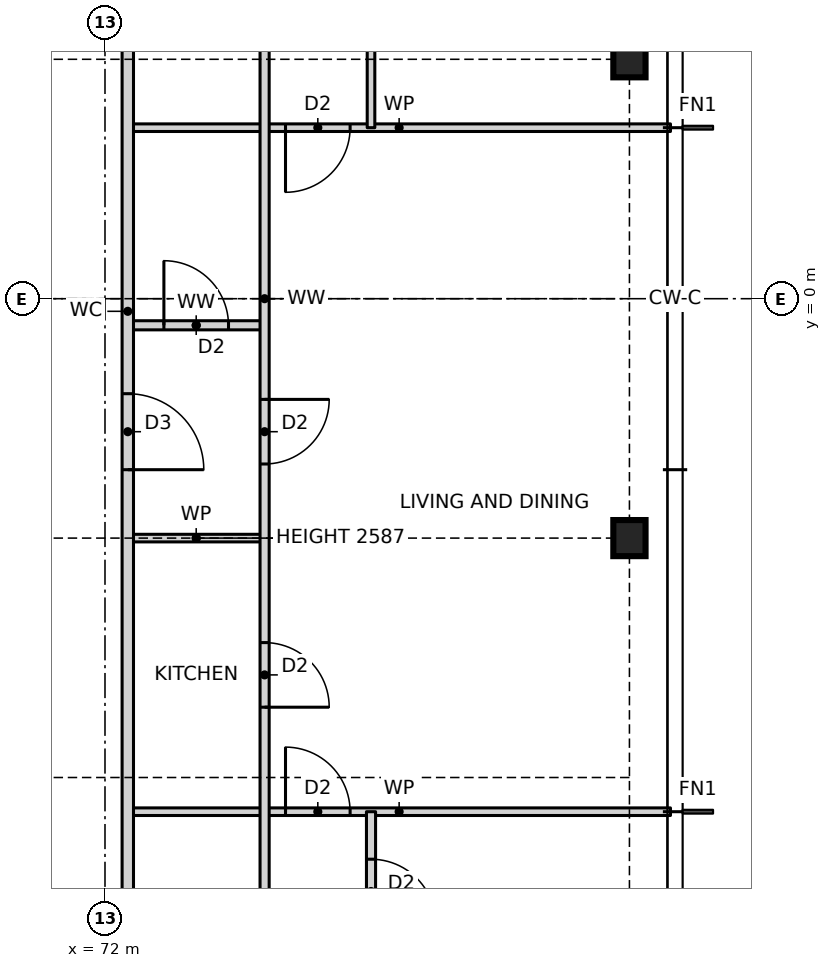
"""IFC4 building model, lengths in metres.
Left out: names, types, materials, properties, quantities, classifications, styles, units other than length and angle.
Written with IfcOpenShell. Run it as: python <this file> out.ifc"""

import sys

from ifc_helpers import new_model, si_unit, direction, frame, frame_2d, origin, origin_2d, place, context, subcontext, project, spatial, rectangle, i_section, extrude, element, fill, save


model = new_model("IFC4")
c1 = context("Model", 3, precision=1e-05, world=origin(), true_north=direction((0.0, 1.0)))
c2 = subcontext(c1, "Body", "Model", "MODEL_VIEW")
j1 = project(units=[si_unit("LENGTHUNIT", "METRE"), si_unit("PLANEANGLEUNIT", "RADIAN")], contexts=[c1])
p1 = place(None, origin())
s1 = spatial("IfcSite", under=j1, at=p1, CompositionType="ELEMENT")
p2 = place(p1, origin())
s2 = spatial("IfcBuilding", under=s1, at=p2, CompositionType="ELEMENT")
p3 = place(p2, frame((0.0, 0.0, 64.0)))
s3 = spatial("IfcBuildingStorey", under=s2, at=p3, CompositionType="ELEMENT", Elevation=64.0)
for number, where, z_axis, x_axis in (
    (1, (78.9, -3.15, 0.0), (0.0, 0.0, 1.0), (1.0, 0.0, 0.0)),
    (2, (78.9, 3.15, 0.0), (0.0, 0.0, 1.0), (1.0, 0.0, 0.0)),
):
    element("IfcColumn", number, at=place(p3, frame(where, z_axis=z_axis, x_axis=x_axis)), inside=s3, PredefinedType="COLUMN", context=c2, shape_type="SweptSolid", body=[
        extrude(i_section(OverallWidth=0.424, OverallDepth=0.475, WebThickness=0.048, FlangeThickness=0.077, at=origin_2d()), origin(), (0.0, 0.0, 1.0), 3.5),
    ])
p4 = place(p3, frame((72.3, -6.75, 0.0), z_axis=(0.0, 0.0, 1.0), x_axis=(1.0, 0.0, 0.0)))
e3 = element("IfcWall", 3, at=p4, inside=s3, PredefinedType="PARTITIONING", context=c2, shape_type="SweptSolid", body=[
    extrude(rectangle(XDim=7.14, YDim=0.1, at=frame_2d((3.57, 0.0))), origin(), (0.0, 0.0, 1.0), 3.27),
])
p5 = place(p4, frame((2.075, 0.0, 0.0)))
e4 = element("IfcOpeningElement", 4, at=p5, cuts=e3, PredefinedType="OPENING", context=c2, shape_type="SweptSolid", body=[
    extrude(rectangle(XDim=0.85, YDim=2.1, at=frame_2d((0.425, 1.05))), frame((0.0, 0.06, 0.0), z_axis=(0.0, -1.0, 0.0), x_axis=(1.0, 0.0, 0.0)), (0.0, 0.0, 1.0), 0.12),
])
p6 = place(p3, frame((72.3, -3.15, 0.0), z_axis=(0.0, 0.0, 1.0), x_axis=(1.0, 0.0, 0.0)))
e5 = element("IfcWall", 5, at=p6, inside=s3, PredefinedType="PARTITIONING", context=c2, shape_type="SweptSolid", body=[
    extrude(rectangle(XDim=1.8, YDim=0.1, at=frame_2d((0.9, 0.0))), origin(), (0.0, 0.0, 1.0), 2.587),
])
p7 = place(p3, frame((72.3, -0.35, 0.0), z_axis=(0.0, 0.0, 1.0), x_axis=(1.0, 0.0, 0.0)))
e6 = element("IfcWall", 6, at=p7, inside=s3, PredefinedType="PARTITIONING", context=c2, shape_type="SweptSolid", body=[
    extrude(rectangle(XDim=1.8, YDim=0.12, at=frame_2d((0.9, 0.0))), origin(), (0.0, 0.0, 1.0), 3.27),
])
p8 = place(p7, frame((0.475, 0.0, 0.0)))
e7 = element("IfcOpeningElement", 7, at=p8, cuts=e6, PredefinedType="OPENING", context=c2, shape_type="SweptSolid", body=[
    extrude(rectangle(XDim=0.85, YDim=2.1, at=frame_2d((0.425, 1.05))), frame((0.0, 0.07, 0.0), z_axis=(0.0, -1.0, 0.0), x_axis=(1.0, 0.0, 0.0)), (0.0, 0.0, 1.0), 0.14),
])
p9 = place(p3, frame((72.3, 2.25, 0.0), z_axis=(0.0, 0.0, 1.0), x_axis=(1.0, 0.0, 0.0)))
e8 = element("IfcWall", 8, at=p9, inside=s3, PredefinedType="PARTITIONING", context=c2, shape_type="SweptSolid", body=[
    extrude(rectangle(XDim=7.14, YDim=0.1, at=frame_2d((3.57, 0.0))), origin(), (0.0, 0.0, 1.0), 3.27),
])
p10 = place(p9, frame((2.075, 0.0, 0.0)))
e9 = element("IfcOpeningElement", 9, at=p10, cuts=e8, PredefinedType="OPENING", context=c2, shape_type="SweptSolid", body=[
    extrude(rectangle(XDim=0.85, YDim=2.1, at=frame_2d((0.425, 1.05))), frame((0.0, 0.06, 0.0), z_axis=(0.0, -1.0, 0.0), x_axis=(1.0, 0.0, 0.0)), (0.0, 0.0, 1.0), 0.12),
])
p11 = place(p3, frame((75.5, -13.45, 0.0), z_axis=(0.0, 0.0, 1.0), x_axis=(0.0, 1.0, 0.0)))
e10 = element("IfcWall", 10, at=p11, inside=s3, PredefinedType="PARTITIONING", context=c2, shape_type="SweptSolid", body=[
    extrude(rectangle(XDim=6.7, YDim=0.12, at=frame_2d((3.35, 0.0))), origin(), (0.0, 0.0, 1.0), 3.27),
])
p12 = place(p11, frame((5.225, 0.0, 0.0)))
e11 = element("IfcOpeningElement", 11, at=p12, cuts=e10, PredefinedType="OPENING", context=c2, shape_type="SweptSolid", body=[
    extrude(rectangle(XDim=0.85, YDim=2.1, at=frame_2d((0.425, 1.05))), frame((0.0, 0.07, 0.0), z_axis=(0.0, -1.0, 0.0), x_axis=(1.0, 0.0, 0.0)), (0.0, 0.0, 1.0), 0.14),
])
p13 = place(p11, frame((0.675, 0.0, 0.0)))
e12 = element("IfcOpeningElement", 12, at=p13, cuts=e10, PredefinedType="OPENING", context=c2, shape_type="SweptSolid", body=[
    extrude(rectangle(XDim=0.85, YDim=2.1, at=frame_2d((0.425, 1.05))), frame((0.0, 0.07, 0.0), z_axis=(0.0, -1.0, 0.0), x_axis=(1.0, 0.0, 0.0)), (0.0, 0.0, 1.0), 0.14),
])
p14 = place(p3, frame((75.5, 2.25, 0.0), z_axis=(0.0, 0.0, 1.0), x_axis=(0.0, 1.0, 0.0)))
e13 = element("IfcWall", 13, at=p14, inside=s3, PredefinedType="PARTITIONING", context=c2, shape_type="SweptSolid", body=[
    extrude(rectangle(XDim=11.2, YDim=0.1, at=frame_2d((5.6, 0.0))), origin(), (0.0, 0.0, 1.0), 3.27),
])
p15 = place(p14, frame((1.825, 0.0, 0.0)))
e14 = element("IfcOpeningElement", 14, at=p15, cuts=e13, PredefinedType="OPENING", context=c2, shape_type="SweptSolid", body=[
    extrude(rectangle(XDim=0.85, YDim=2.1, at=frame_2d((0.425, 1.05))), frame((0.0, 0.06, 0.0), z_axis=(0.0, -1.0, 0.0), x_axis=(1.0, 0.0, 0.0)), (0.0, 0.0, 1.0), 0.12),
])
p16 = place(p14, frame((6.325, 0.0, 0.0)))
e15 = element("IfcOpeningElement", 15, at=p16, cuts=e13, PredefinedType="OPENING", context=c2, shape_type="SweptSolid", body=[
    extrude(rectangle(XDim=0.85, YDim=2.1, at=frame_2d((0.425, 1.05))), frame((0.0, 0.06, 0.0), z_axis=(0.0, -1.0, 0.0), x_axis=(1.0, 0.0, 0.0)), (0.0, 0.0, 1.0), 0.12),
])
p17 = place(p14, frame((9.675, 0.0, 0.0)))
e16 = element("IfcOpeningElement", 16, at=p17, cuts=e13, PredefinedType="OPENING", context=c2, shape_type="SweptSolid", body=[
    extrude(rectangle(XDim=0.85, YDim=2.1, at=frame_2d((0.425, 1.05))), frame((0.0, 0.06, 0.0), z_axis=(0.0, -1.0, 0.0), x_axis=(1.0, 0.0, 0.0)), (0.0, 0.0, 1.0), 0.12),
])
p18 = place(p3, frame((74.1, -12.614, 0.0), z_axis=(0.0, 0.0, 1.0), x_axis=(0.0, 1.0, 0.0)))
e17 = element("IfcWall", 17, at=p18, inside=s3, PredefinedType="PARTITIONING", context=c2, shape_type="SweptSolid", body=[
    extrude(rectangle(XDim=25.228, YDim=0.12, at=frame_2d((12.614, 0.0))), origin(), (0.0, 0.0, 1.0), 3.27),
])
p19 = place(p18, frame((7.239, 0.0, 0.0)))
e18 = element("IfcOpeningElement", 18, at=p19, cuts=e17, PredefinedType="OPENING", context=c2, shape_type="SweptSolid", body=[
    extrude(rectangle(XDim=0.85, YDim=2.1, at=frame_2d((0.425, 1.05))), frame((0.0, 0.07, 0.0), z_axis=(0.0, -1.0, 0.0), x_axis=(1.0, 0.0, 0.0)), (0.0, 0.0, 1.0), 0.14),
])
p20 = place(p18, frame((10.439, 0.0, 0.0)))
e19 = element("IfcOpeningElement", 19, at=p20, cuts=e17, PredefinedType="OPENING", context=c2, shape_type="SweptSolid", body=[
    extrude(rectangle(XDim=0.85, YDim=2.1, at=frame_2d((0.425, 1.05))), frame((0.0, 0.07, 0.0), z_axis=(0.0, -1.0, 0.0), x_axis=(1.0, 0.0, 0.0)), (0.0, 0.0, 1.0), 0.14),
])
p21 = place(p18, frame((2.507, 0.0, 0.0)))
e20 = element("IfcOpeningElement", 20, at=p21, cuts=e17, PredefinedType="OPENING", context=c2, shape_type="SweptSolid", body=[
    extrude(rectangle(XDim=0.85, YDim=2.1, at=frame_2d((0.425, 1.05))), frame((0.0, 0.07, 0.0), z_axis=(0.0, -1.0, 0.0), x_axis=(1.0, 0.0, 0.0)), (0.0, 0.0, 1.0), 0.14),
])
p22 = place(p18, frame((16.639, 0.0, 0.0)))
e21 = element("IfcOpeningElement", 21, at=p22, cuts=e17, PredefinedType="OPENING", context=c2, shape_type="SweptSolid", body=[
    extrude(rectangle(XDim=0.85, YDim=2.1, at=frame_2d((0.425, 1.05))), frame((0.0, 0.07, 0.0), z_axis=(0.0, -1.0, 0.0), x_axis=(1.0, 0.0, 0.0)), (0.0, 0.0, 1.0), 0.14),
])
p23 = place(p18, frame((21.821, 0.0, 0.0)))
e22 = element("IfcOpeningElement", 22, at=p23, cuts=e17, PredefinedType="OPENING", context=c2, shape_type="SweptSolid", body=[
    extrude(rectangle(XDim=0.85, YDim=2.1, at=frame_2d((0.425, 1.05))), frame((0.0, 0.07, 0.0), z_axis=(0.0, -1.0, 0.0), x_axis=(1.0, 0.0, 0.0)), (0.0, 0.0, 1.0), 0.14),
])
p24 = place(p3, frame((72.3, -10.9, 0.0), z_axis=(0.0, 0.0, 1.0), x_axis=(0.0, 1.0, 0.0)))
e23 = element("IfcWall", 23, at=p24, inside=s3, PredefinedType="PARTITIONING", context=c2, shape_type="SweptSolid", body=[
    extrude(rectangle(XDim=21.468, YDim=0.15, at=frame_2d((10.734, 0.0))), origin(), (0.0, 0.0, 1.0), 3.27),
])
p25 = place(p24, frame((8.65, 0.0, 0.0)))
e24 = element("IfcOpeningElement", 24, at=p25, cuts=e23, PredefinedType="OPENING", context=c2, shape_type="SweptSolid", body=[
    extrude(rectangle(XDim=1.0, YDim=2.1, at=frame_2d((0.5, 1.05))), frame((0.0, 0.085, 0.0), z_axis=(0.0, -1.0, 0.0), x_axis=(1.0, 0.0, 0.0)), (0.0, 0.0, 1.0), 0.17),
])
p26 = place(p19, frame((0.85, 0.0, 0.0), z_axis=(0.0, 0.0, 1.0), x_axis=(-1.0, 0.0, 0.0)))
e25 = element("IfcDoor", 25, at=p26, inside=s3, OperationType="SINGLE_SWING_RIGHT", PredefinedType="DOOR", context=c2, shape_type="SweptSolid", body=[
    extrude(rectangle(XDim=0.85, YDim=2.1, at=frame_2d((0.425, 1.05))), frame((0.0, 0.025, 0.0), z_axis=(0.0, -1.0, 0.0), x_axis=(1.0, 0.0, 0.0)), (0.0, 0.0, 1.0), 0.05),
])
fill(e18, e25)
p27 = place(p25, frame((1.0, 0.0, 0.0), z_axis=(0.0, 0.0, 1.0), x_axis=(-1.0, 0.0, 0.0)))
e26 = element("IfcDoor", 26, at=p27, inside=s3, OperationType="SINGLE_SWING_RIGHT", PredefinedType="DOOR", context=c2, shape_type="SweptSolid", body=[
    extrude(rectangle(XDim=1.0, YDim=2.1, at=frame_2d((0.5, 1.05))), frame((0.0, 0.025, 0.0), z_axis=(0.0, -1.0, 0.0), x_axis=(1.0, 0.0, 0.0)), (0.0, 0.0, 1.0), 0.05),
])
fill(e24, e26)
p28 = place(p20, frame((0.85, 0.0, 0.0), z_axis=(0.0, 0.0, 1.0), x_axis=(-1.0, 0.0, 0.0)))
e27 = element("IfcDoor", 27, at=p28, inside=s3, OperationType="SINGLE_SWING_LEFT", PredefinedType="DOOR", context=c2, shape_type="SweptSolid", body=[
    extrude(rectangle(XDim=0.85, YDim=2.1, at=frame_2d((0.425, 1.05))), frame((0.0, 0.025, 0.0), z_axis=(0.0, -1.0, 0.0), x_axis=(1.0, 0.0, 0.0)), (0.0, 0.0, 1.0), 0.05),
])
fill(e19, e27)
p29 = place(p8, origin())
e28 = element("IfcDoor", 28, at=p29, inside=s3, OperationType="SINGLE_SWING_LEFT", PredefinedType="DOOR", context=c2, shape_type="SweptSolid", body=[
    extrude(rectangle(XDim=0.85, YDim=2.1, at=frame_2d((0.425, 1.05))), frame((0.0, 0.025, 0.0), z_axis=(0.0, -1.0, 0.0), x_axis=(1.0, 0.0, 0.0)), (0.0, 0.0, 1.0), 0.05),
])
fill(e7, e28)
p30 = place(p5, origin())
e29 = element("IfcDoor", 29, at=p30, inside=s3, OperationType="SINGLE_SWING_LEFT", PredefinedType="DOOR", context=c2, shape_type="SweptSolid", body=[
    extrude(rectangle(XDim=0.85, YDim=2.1, at=frame_2d((0.425, 1.05))), frame((0.0, 0.025, 0.0), z_axis=(0.0, -1.0, 0.0), x_axis=(1.0, 0.0, 0.0)), (0.0, 0.0, 1.0), 0.05),
])
fill(e4, e29)
p31 = place(p12, frame((0.85, 0.0, 0.0), z_axis=(0.0, 0.0, 1.0), x_axis=(-1.0, 0.0, 0.0)))
e30 = element("IfcDoor", 30, at=p31, inside=s3, OperationType="SINGLE_SWING_RIGHT", PredefinedType="DOOR", context=c2, shape_type="SweptSolid", body=[
    extrude(rectangle(XDim=0.85, YDim=2.1, at=frame_2d((0.425, 1.05))), frame((0.0, 0.025, 0.0), z_axis=(0.0, -1.0, 0.0), x_axis=(1.0, 0.0, 0.0)), (0.0, 0.0, 1.0), 0.05),
])
fill(e11, e30)
p32 = place(p10, frame((0.85, 0.0, 0.0), z_axis=(0.0, 0.0, 1.0), x_axis=(-1.0, 0.0, 0.0)))
e31 = element("IfcDoor", 31, at=p32, inside=s3, OperationType="SINGLE_SWING_RIGHT", PredefinedType="DOOR", context=c2, shape_type="SweptSolid", body=[
    extrude(rectangle(XDim=0.85, YDim=2.1, at=frame_2d((0.425, 1.05))), frame((0.0, 0.025, 0.0), z_axis=(0.0, -1.0, 0.0), x_axis=(1.0, 0.0, 0.0)), (0.0, 0.0, 1.0), 0.05),
])
fill(e9, e31)
save(model, sys.argv[1])
